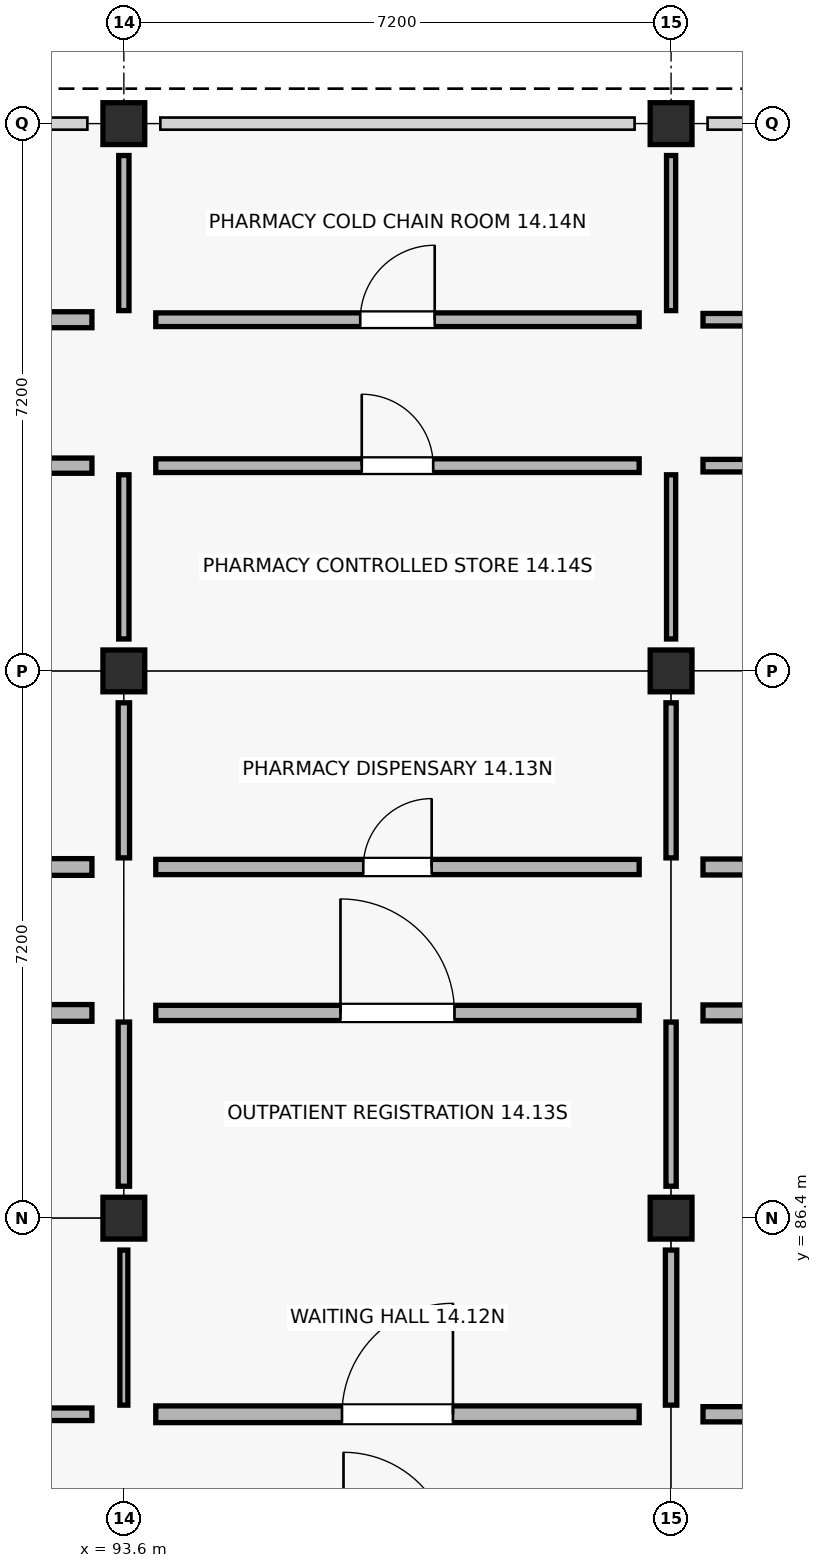
"""IFC4 building model, lengths in metres.
Left out: names, types, materials, properties, quantities, classifications, styles, units other than length and angle.
Written with IfcOpenShell. Run it as: python <this file> out.ifc"""

import sys

from ifc_helpers import new_model, si_unit, direction, frame, frame_2d, origin, origin_2d, place, context, subcontext, project, spatial, rectangle, extrude, element, fill, save


model = new_model("IFC4")
c1 = context("Model", 3, precision=1e-05, world=origin(), true_north=direction((0.0, 1.0)))
c2 = subcontext(c1, "Body", "Model", "MODEL_VIEW")
j1 = project(units=[si_unit("LENGTHUNIT", "METRE"), si_unit("PLANEANGLEUNIT", "RADIAN")], contexts=[c1])
p1 = place(None, origin())
s1 = spatial("IfcSite", under=j1, at=p1, CompositionType="ELEMENT")
p2 = place(p1, origin())
s2 = spatial("IfcBuilding", under=s1, at=p2, CompositionType="ELEMENT")
p3 = place(p2, origin())
s3 = spatial("IfcBuildingStorey", under=s2, at=p3, CompositionType="ELEMENT", Elevation=0.0)
for number, where, z_axis, x_axis in (
    (1, (93.6, 86.4, -0.25), (0.0, 0.0, 1.0), (1.0, 0.0, 0.0)),
    (2, (93.6, 93.6, -0.25), (0.0, 0.0, 1.0), (1.0, 0.0, 0.0)),
    (3, (93.6, 100.8, -0.25), (0.0, 0.0, 1.0), (1.0, 0.0, 0.0)),
    (4, (100.8, 86.4, -0.25), (0.0, 0.0, 1.0), (1.0, 0.0, 0.0)),
    (5, (100.8, 93.6, -0.25), (0.0, 0.0, 1.0), (1.0, 0.0, 0.0)),
    (6, (100.8, 100.8, -0.25), (0.0, 0.0, 1.0), (1.0, 0.0, 0.0)),
):
    element("IfcColumn", number, at=place(p3, frame(where, z_axis=z_axis, x_axis=x_axis)), inside=s3, PredefinedType="COLUMN", context=c2, shape_type="SweptSolid", body=[
        extrude(rectangle(XDim=0.55, YDim=0.55, at=origin_2d()), origin(), (0.0, 0.0, 1.0), 4.75),
    ])
p4 = place(p3, frame((86.82, 83.82, 0.0), z_axis=(0.0, 0.0, 1.0), x_axis=(1.0, 0.0, 0.0)))
e7 = element("IfcWall", 7, at=p4, inside=s3, PredefinedType="PARTITIONING", context=c2, shape_type="SweptSolid", body=[
    extrude(rectangle(XDim=6.36, YDim=0.165, at=frame_2d((3.18, 0.0))), origin(), (0.0, 0.0, 1.0), 3.36),
])
p5 = place(p4, frame((2.57, 0.0, 0.0)))
e8 = element("IfcOpeningElement", 8, at=p5, cuts=e7, PredefinedType="OPENING", context=c2, shape_type="SweptSolid", body=[
    extrude(rectangle(XDim=1.22, YDim=2.04, at=frame_2d((0.61, 1.02))), frame((0.0, 0.093, 0.0), z_axis=(0.0, -1.0, 0.0), x_axis=(1.0, 0.0, 0.0)), (0.0, 0.0, 1.0), 0.185),
])
p6 = place(p3, frame((93.6, 83.94, 0.0), z_axis=(0.0, 0.0, 1.0), x_axis=(0.0, 1.0, 0.0)))
e9 = element("IfcWall", 9, at=p6, inside=s3, PredefinedType="PARTITIONING", context=c2, shape_type="SweptSolid", body=[
    extrude(rectangle(XDim=2.04, YDim=0.105, at=frame_2d((1.02, 0.0))), origin(), (0.0, 0.0, 1.0), 3.36),
])
p7 = place(p3, frame((86.82, 89.1, 0.0), z_axis=(0.0, 0.0, 1.0), x_axis=(1.0, 0.0, 0.0)))
e10 = element("IfcWall", 10, at=p7, inside=s3, PredefinedType="SOLIDWALL", context=c2, shape_type="SweptSolid", body=[
    extrude(rectangle(XDim=6.36, YDim=0.22, at=frame_2d((3.18, 0.0))), origin(), (0.0, 0.0, 1.0), 3.36),
])
p8 = place(p7, frame((2.55, 0.0, 0.0)))
e11 = element("IfcOpeningElement", 11, at=p8, cuts=e10, PredefinedType="OPENING", context=c2, shape_type="SweptSolid", body=[
    extrude(rectangle(XDim=1.26, YDim=2.04, at=frame_2d((0.63, 1.02))), frame((0.0, 0.12, 0.0), z_axis=(0.0, -1.0, 0.0), x_axis=(1.0, 0.0, 0.0)), (0.0, 0.0, 1.0), 0.24),
])
p9 = place(p3, frame((93.6, 86.82, 0.0), z_axis=(0.0, 0.0, 1.0), x_axis=(0.0, 1.0, 0.0)))
e12 = element("IfcWall", 12, at=p9, inside=s3, PredefinedType="PARTITIONING", context=c2, shape_type="SweptSolid", body=[
    extrude(rectangle(XDim=2.16, YDim=0.15, at=frame_2d((1.08, 0.0))), origin(), (0.0, 0.0, 1.0), 3.36),
])
p10 = place(p3, frame((86.82, 91.02, 0.0), z_axis=(0.0, 0.0, 1.0), x_axis=(1.0, 0.0, 0.0)))
e13 = element("IfcWall", 13, at=p10, inside=s3, PredefinedType="SOLIDWALL", context=c2, shape_type="SweptSolid", body=[
    extrude(rectangle(XDim=6.36, YDim=0.22, at=frame_2d((3.18, 0.0))), origin(), (0.0, 0.0, 1.0), 3.36),
])
p11 = place(p10, frame((2.53, 0.0, 0.0)))
e14 = element("IfcOpeningElement", 14, at=p11, cuts=e13, PredefinedType="OPENING", context=c2, shape_type="SweptSolid", body=[
    extrude(rectangle(XDim=1.3, YDim=2.04, at=frame_2d((0.65, 1.02))), frame((0.0, 0.12, 0.0), z_axis=(0.0, -1.0, 0.0), x_axis=(1.0, 0.0, 0.0)), (0.0, 0.0, 1.0), 0.24),
])
p12 = place(p3, frame((93.6, 91.14, 0.0), z_axis=(0.0, 0.0, 1.0), x_axis=(0.0, 1.0, 0.0)))
e15 = element("IfcWall", 15, at=p12, inside=s3, PredefinedType="PARTITIONING", context=c2, shape_type="SweptSolid", body=[
    extrude(rectangle(XDim=2.04, YDim=0.15, at=frame_2d((1.02, 0.0))), origin(), (0.0, 0.0, 1.0), 3.36),
])
p13 = place(p3, frame((86.82, 96.3, 0.0), z_axis=(0.0, 0.0, 1.0), x_axis=(1.0, 0.0, 0.0)))
e16 = element("IfcWall", 16, at=p13, inside=s3, PredefinedType="SOLIDWALL", context=c2, shape_type="SweptSolid", body=[
    extrude(rectangle(XDim=6.36, YDim=0.2, at=frame_2d((3.18, 0.0))), origin(), (0.0, 0.0, 1.0), 3.36),
])
p14 = place(p13, frame((2.51, 0.0, 0.0)))
e17 = element("IfcOpeningElement", 17, at=p14, cuts=e16, PredefinedType="OPENING", context=c2, shape_type="SweptSolid", body=[
    extrude(rectangle(XDim=1.34, YDim=2.04, at=frame_2d((0.67, 1.02))), frame((0.0, 0.11, 0.0), z_axis=(0.0, -1.0, 0.0), x_axis=(1.0, 0.0, 0.0)), (0.0, 0.0, 1.0), 0.22),
])
p15 = place(p3, frame((93.6, 94.02, 0.0), z_axis=(0.0, 0.0, 1.0), x_axis=(0.0, 1.0, 0.0)))
e18 = element("IfcWall", 18, at=p15, inside=s3, PredefinedType="PARTITIONING", context=c2, shape_type="SweptSolid", body=[
    extrude(rectangle(XDim=2.16, YDim=0.135, at=frame_2d((1.08, 0.0))), origin(), (0.0, 0.0, 1.0), 3.36),
])
p16 = place(p3, frame((86.82, 98.22, 0.0), z_axis=(0.0, 0.0, 1.0), x_axis=(1.0, 0.0, 0.0)))
e19 = element("IfcWall", 19, at=p16, inside=s3, PredefinedType="PLUMBINGWALL", context=c2, shape_type="SweptSolid", body=[
    extrude(rectangle(XDim=6.36, YDim=0.21, at=frame_2d((3.18, 0.0))), origin(), (0.0, 0.0, 1.0), 3.36),
])
p17 = place(p16, frame((2.49, 0.0, 0.0)))
e20 = element("IfcOpeningElement", 20, at=p17, cuts=e19, PredefinedType="OPENING", context=c2, shape_type="SweptSolid", body=[
    extrude(rectangle(XDim=1.38, YDim=2.04, at=frame_2d((0.69, 1.02))), frame((0.0, 0.115, 0.0), z_axis=(0.0, -1.0, 0.0), x_axis=(1.0, 0.0, 0.0)), (0.0, 0.0, 1.0), 0.23),
])
p18 = place(p3, frame((93.6, 98.34, 0.0), z_axis=(0.0, 0.0, 1.0), x_axis=(0.0, 1.0, 0.0)))
e21 = element("IfcWall", 21, at=p18, inside=s3, PredefinedType="PARTITIONING", context=c2, shape_type="SweptSolid", body=[
    extrude(rectangle(XDim=2.04, YDim=0.135, at=frame_2d((1.02, 0.0))), origin(), (0.0, 0.0, 1.0), 3.36),
])
p19 = place(p3, frame((94.02, 83.82, 0.0), z_axis=(0.0, 0.0, 1.0), x_axis=(1.0, 0.0, 0.0)))
e22 = element("IfcWall", 22, at=p19, inside=s3, PredefinedType="SOLIDWALL", context=c2, shape_type="SweptSolid", body=[
    extrude(rectangle(XDim=6.36, YDim=0.22, at=frame_2d((3.18, 0.0))), origin(), (0.0, 0.0, 1.0), 3.36),
])
p20 = place(p19, frame((2.45, 0.0, 0.0)))
e23 = element("IfcOpeningElement", 23, at=p20, cuts=e22, PredefinedType="OPENING", context=c2, shape_type="SweptSolid", body=[
    extrude(rectangle(XDim=1.46, YDim=2.04, at=frame_2d((0.73, 1.02))), frame((0.0, 0.12, 0.0), z_axis=(0.0, -1.0, 0.0), x_axis=(1.0, 0.0, 0.0)), (0.0, 0.0, 1.0), 0.24),
])
p21 = place(p3, frame((100.8, 83.94, 0.0), z_axis=(0.0, 0.0, 1.0), x_axis=(0.0, 1.0, 0.0)))
e24 = element("IfcWall", 24, at=p21, inside=s3, PredefinedType="PARTITIONING", context=c2, shape_type="SweptSolid", body=[
    extrude(rectangle(XDim=2.04, YDim=0.15, at=frame_2d((1.02, 0.0))), origin(), (0.0, 0.0, 1.0), 3.36),
])
p22 = place(p3, frame((94.02, 89.1, 0.0), z_axis=(0.0, 0.0, 1.0), x_axis=(1.0, 0.0, 0.0)))
e25 = element("IfcWall", 25, at=p22, inside=s3, PredefinedType="SOLIDWALL", context=c2, shape_type="SweptSolid", body=[
    extrude(rectangle(XDim=6.36, YDim=0.2, at=frame_2d((3.18, 0.0))), origin(), (0.0, 0.0, 1.0), 3.36),
])
p23 = place(p22, frame((2.43, 0.0, 0.0)))
e26 = element("IfcOpeningElement", 26, at=p23, cuts=e25, PredefinedType="OPENING", context=c2, shape_type="SweptSolid", body=[
    extrude(rectangle(XDim=1.5, YDim=2.04, at=frame_2d((0.75, 1.02))), frame((0.0, 0.11, 0.0), z_axis=(0.0, -1.0, 0.0), x_axis=(1.0, 0.0, 0.0)), (0.0, 0.0, 1.0), 0.22),
])
p24 = place(p3, frame((100.8, 86.82, 0.0), z_axis=(0.0, 0.0, 1.0), x_axis=(0.0, 1.0, 0.0)))
e27 = element("IfcWall", 27, at=p24, inside=s3, PredefinedType="PARTITIONING", context=c2, shape_type="SweptSolid", body=[
    extrude(rectangle(XDim=2.16, YDim=0.135, at=frame_2d((1.08, 0.0))), origin(), (0.0, 0.0, 1.0), 3.36),
])
p25 = place(p3, frame((94.02, 91.02, 0.0), z_axis=(0.0, 0.0, 1.0), x_axis=(1.0, 0.0, 0.0)))
e28 = element("IfcWall", 28, at=p25, inside=s3, PredefinedType="SOLIDWALL", context=c2, shape_type="SweptSolid", body=[
    extrude(rectangle(XDim=6.36, YDim=0.2, at=frame_2d((3.18, 0.0))), origin(), (0.0, 0.0, 1.0), 3.36),
])
p26 = place(p25, frame((2.73, 0.0, 0.0)))
e29 = element("IfcOpeningElement", 29, at=p26, cuts=e28, PredefinedType="OPENING", context=c2, shape_type="SweptSolid", body=[
    extrude(rectangle(XDim=0.9, YDim=2.09, at=frame_2d((0.45, 1.045))), frame((0.0, 0.11, 0.0), z_axis=(0.0, -1.0, 0.0), x_axis=(1.0, 0.0, 0.0)), (0.0, 0.0, 1.0), 0.22),
])
p27 = place(p3, frame((100.8, 91.14, 0.0), z_axis=(0.0, 0.0, 1.0), x_axis=(0.0, 1.0, 0.0)))
e30 = element("IfcWall", 30, at=p27, inside=s3, PredefinedType="PARTITIONING", context=c2, shape_type="SweptSolid", body=[
    extrude(rectangle(XDim=2.04, YDim=0.135, at=frame_2d((1.02, 0.0))), origin(), (0.0, 0.0, 1.0), 3.36),
])
p28 = place(p3, frame((94.02, 96.3, 0.0), z_axis=(0.0, 0.0, 1.0), x_axis=(1.0, 0.0, 0.0)))
e31 = element("IfcWall", 31, at=p28, inside=s3, PredefinedType="PARTITIONING", context=c2, shape_type="SweptSolid", body=[
    extrude(rectangle(XDim=6.36, YDim=0.18, at=frame_2d((3.18, 0.0))), origin(), (0.0, 0.0, 1.0), 3.36),
])
p29 = place(p28, frame((2.71, 0.0, 0.0)))
e32 = element("IfcOpeningElement", 32, at=p29, cuts=e31, PredefinedType="OPENING", context=c2, shape_type="SweptSolid", body=[
    extrude(rectangle(XDim=0.94, YDim=2.09, at=frame_2d((0.47, 1.045))), frame((0.0, 0.1, 0.0), z_axis=(0.0, -1.0, 0.0), x_axis=(1.0, 0.0, 0.0)), (0.0, 0.0, 1.0), 0.2),
])
p30 = place(p3, frame((100.8, 94.02, 0.0), z_axis=(0.0, 0.0, 1.0), x_axis=(0.0, 1.0, 0.0)))
e33 = element("IfcWall", 33, at=p30, inside=s3, PredefinedType="PARTITIONING", context=c2, shape_type="SweptSolid", body=[
    extrude(rectangle(XDim=2.16, YDim=0.12, at=frame_2d((1.08, 0.0))), origin(), (0.0, 0.0, 1.0), 3.36),
])
p31 = place(p3, frame((94.02, 98.22, 0.0), z_axis=(0.0, 0.0, 1.0), x_axis=(1.0, 0.0, 0.0)))
e34 = element("IfcWall", 34, at=p31, inside=s3, PredefinedType="PARTITIONING", context=c2, shape_type="SweptSolid", body=[
    extrude(rectangle(XDim=6.36, YDim=0.18, at=frame_2d((3.18, 0.0))), origin(), (0.0, 0.0, 1.0), 3.36),
])
p32 = place(p31, frame((2.69, 0.0, 0.0)))
e35 = element("IfcOpeningElement", 35, at=p32, cuts=e34, PredefinedType="OPENING", context=c2, shape_type="SweptSolid", body=[
    extrude(rectangle(XDim=0.98, YDim=2.09, at=frame_2d((0.49, 1.045))), frame((0.0, 0.1, 0.0), z_axis=(0.0, -1.0, 0.0), x_axis=(1.0, 0.0, 0.0)), (0.0, 0.0, 1.0), 0.2),
])
p33 = place(p3, frame((100.8, 98.34, 0.0), z_axis=(0.0, 0.0, 1.0), x_axis=(0.0, 1.0, 0.0)))
e36 = element("IfcWall", 36, at=p33, inside=s3, PredefinedType="PARTITIONING", context=c2, shape_type="SweptSolid", body=[
    extrude(rectangle(XDim=2.04, YDim=0.12, at=frame_2d((1.02, 0.0))), origin(), (0.0, 0.0, 1.0), 3.36),
])
p34 = place(p3, frame((101.22, 83.82, 0.0), z_axis=(0.0, 0.0, 1.0), x_axis=(1.0, 0.0, 0.0)))
e37 = element("IfcWall", 37, at=p34, inside=s3, PredefinedType="SOLIDWALL", context=c2, shape_type="SweptSolid", body=[
    extrude(rectangle(XDim=6.36, YDim=0.2, at=frame_2d((3.18, 0.0))), origin(), (0.0, 0.0, 1.0), 3.36),
])
p35 = place(p34, frame((2.65, 0.0, 0.0)))
e38 = element("IfcOpeningElement", 38, at=p35, cuts=e37, PredefinedType="OPENING", context=c2, shape_type="SweptSolid", body=[
    extrude(rectangle(XDim=1.06, YDim=2.09, at=frame_2d((0.53, 1.045))), frame((0.0, 0.11, 0.0), z_axis=(0.0, -1.0, 0.0), x_axis=(1.0, 0.0, 0.0)), (0.0, 0.0, 1.0), 0.22),
])
p36 = place(p3, frame((101.22, 89.1, 0.0), z_axis=(0.0, 0.0, 1.0), x_axis=(1.0, 0.0, 0.0)))
e39 = element("IfcWall", 39, at=p36, inside=s3, PredefinedType="PLUMBINGWALL", context=c2, shape_type="SweptSolid", body=[
    extrude(rectangle(XDim=6.36, YDim=0.21, at=frame_2d((3.18, 0.0))), origin(), (0.0, 0.0, 1.0), 3.36),
])
p37 = place(p36, frame((2.63, 0.0, 0.0)))
e40 = element("IfcOpeningElement", 40, at=p37, cuts=e39, PredefinedType="OPENING", context=c2, shape_type="SweptSolid", body=[
    extrude(rectangle(XDim=1.1, YDim=2.09, at=frame_2d((0.55, 1.045))), frame((0.0, 0.115, 0.0), z_axis=(0.0, -1.0, 0.0), x_axis=(1.0, 0.0, 0.0)), (0.0, 0.0, 1.0), 0.23),
])
p38 = place(p3, frame((101.22, 91.02, 0.0), z_axis=(0.0, 0.0, 1.0), x_axis=(1.0, 0.0, 0.0)))
e41 = element("IfcWall", 41, at=p38, inside=s3, PredefinedType="PLUMBINGWALL", context=c2, shape_type="SweptSolid", body=[
    extrude(rectangle(XDim=6.36, YDim=0.21, at=frame_2d((3.18, 0.0))), origin(), (0.0, 0.0, 1.0), 3.36),
])
p39 = place(p38, frame((2.61, 0.0, 0.0)))
e42 = element("IfcOpeningElement", 42, at=p39, cuts=e41, PredefinedType="OPENING", context=c2, shape_type="SweptSolid", body=[
    extrude(rectangle(XDim=1.14, YDim=2.09, at=frame_2d((0.57, 1.045))), frame((0.0, 0.115, 0.0), z_axis=(0.0, -1.0, 0.0), x_axis=(1.0, 0.0, 0.0)), (0.0, 0.0, 1.0), 0.23),
])
p40 = place(p3, frame((101.22, 96.3, 0.0), z_axis=(0.0, 0.0, 1.0), x_axis=(1.0, 0.0, 0.0)))
e43 = element("IfcWall", 43, at=p40, inside=s3, PredefinedType="PARTITIONING", context=c2, shape_type="SweptSolid", body=[
    extrude(rectangle(XDim=6.36, YDim=0.165, at=frame_2d((3.18, 0.0))), origin(), (0.0, 0.0, 1.0), 3.36),
])
p41 = place(p40, frame((2.59, 0.0, 0.0)))
e44 = element("IfcOpeningElement", 44, at=p41, cuts=e43, PredefinedType="OPENING", context=c2, shape_type="SweptSolid", body=[
    extrude(rectangle(XDim=1.18, YDim=2.09, at=frame_2d((0.59, 1.045))), frame((0.0, 0.093, 0.0), z_axis=(0.0, -1.0, 0.0), x_axis=(1.0, 0.0, 0.0)), (0.0, 0.0, 1.0), 0.185),
])
p42 = place(p3, frame((101.22, 98.22, 0.0), z_axis=(0.0, 0.0, 1.0), x_axis=(1.0, 0.0, 0.0)))
e45 = element("IfcWall", 45, at=p42, inside=s3, PredefinedType="PARTITIONING", context=c2, shape_type="SweptSolid", body=[
    extrude(rectangle(XDim=6.36, YDim=0.165, at=frame_2d((3.18, 0.0))), origin(), (0.0, 0.0, 1.0), 3.36),
])
p43 = place(p42, frame((2.57, 0.0, 0.0)))
e46 = element("IfcOpeningElement", 46, at=p43, cuts=e45, PredefinedType="OPENING", context=c2, shape_type="SweptSolid", body=[
    extrude(rectangle(XDim=1.22, YDim=2.09, at=frame_2d((0.61, 1.045))), frame((0.0, 0.093, 0.0), z_axis=(0.0, -1.0, 0.0), x_axis=(1.0, 0.0, 0.0)), (0.0, 0.0, 1.0), 0.185),
])
p44 = place(p20, origin())
e47 = element("IfcDoor", 47, at=p44, inside=s3, OperationType="SINGLE_SWING_RIGHT", PredefinedType="DOOR", context=c2, shape_type="SweptSolid", body=[
    extrude(rectangle(XDim=1.46, YDim=2.04, at=frame_2d((0.73, 1.02))), frame((0.0, 0.025, 0.0), z_axis=(0.0, -1.0, 0.0), x_axis=(1.0, 0.0, 0.0)), (0.0, 0.0, 1.0), 0.05),
])
fill(e23, e47)
p45 = place(p23, origin())
e48 = element("IfcDoor", 48, at=p45, inside=s3, OperationType="SINGLE_SWING_LEFT", PredefinedType="DOOR", context=c2, shape_type="SweptSolid", body=[
    extrude(rectangle(XDim=1.5, YDim=2.04, at=frame_2d((0.75, 1.02))), frame((0.0, 0.025, 0.0), z_axis=(0.0, -1.0, 0.0), x_axis=(1.0, 0.0, 0.0)), (0.0, 0.0, 1.0), 0.05),
])
fill(e26, e48)
p46 = place(p26, origin())
e49 = element("IfcDoor", 49, at=p46, inside=s3, OperationType="SINGLE_SWING_RIGHT", PredefinedType="DOOR", context=c2, shape_type="SweptSolid", body=[
    extrude(rectangle(XDim=0.9, YDim=2.09, at=frame_2d((0.45, 1.045))), frame((0.0, 0.025, 0.0), z_axis=(0.0, -1.0, 0.0), x_axis=(1.0, 0.0, 0.0)), (0.0, 0.0, 1.0), 0.05),
])
fill(e29, e49)
p47 = place(p29, origin())
e50 = element("IfcDoor", 50, at=p47, inside=s3, OperationType="SINGLE_SWING_LEFT", PredefinedType="DOOR", context=c2, shape_type="SweptSolid", body=[
    extrude(rectangle(XDim=0.94, YDim=2.09, at=frame_2d((0.47, 1.045))), frame((0.0, 0.025, 0.0), z_axis=(0.0, -1.0, 0.0), x_axis=(1.0, 0.0, 0.0)), (0.0, 0.0, 1.0), 0.05),
])
fill(e32, e50)
p48 = place(p32, origin())
e51 = element("IfcDoor", 51, at=p48, inside=s3, OperationType="SINGLE_SWING_RIGHT", PredefinedType="DOOR", context=c2, shape_type="SweptSolid", body=[
    extrude(rectangle(XDim=0.98, YDim=2.09, at=frame_2d((0.49, 1.045))), frame((0.0, 0.025, 0.0), z_axis=(0.0, -1.0, 0.0), x_axis=(1.0, 0.0, 0.0)), (0.0, 0.0, 1.0), 0.05),
])
fill(e35, e51)
save(model, sys.argv[1])
